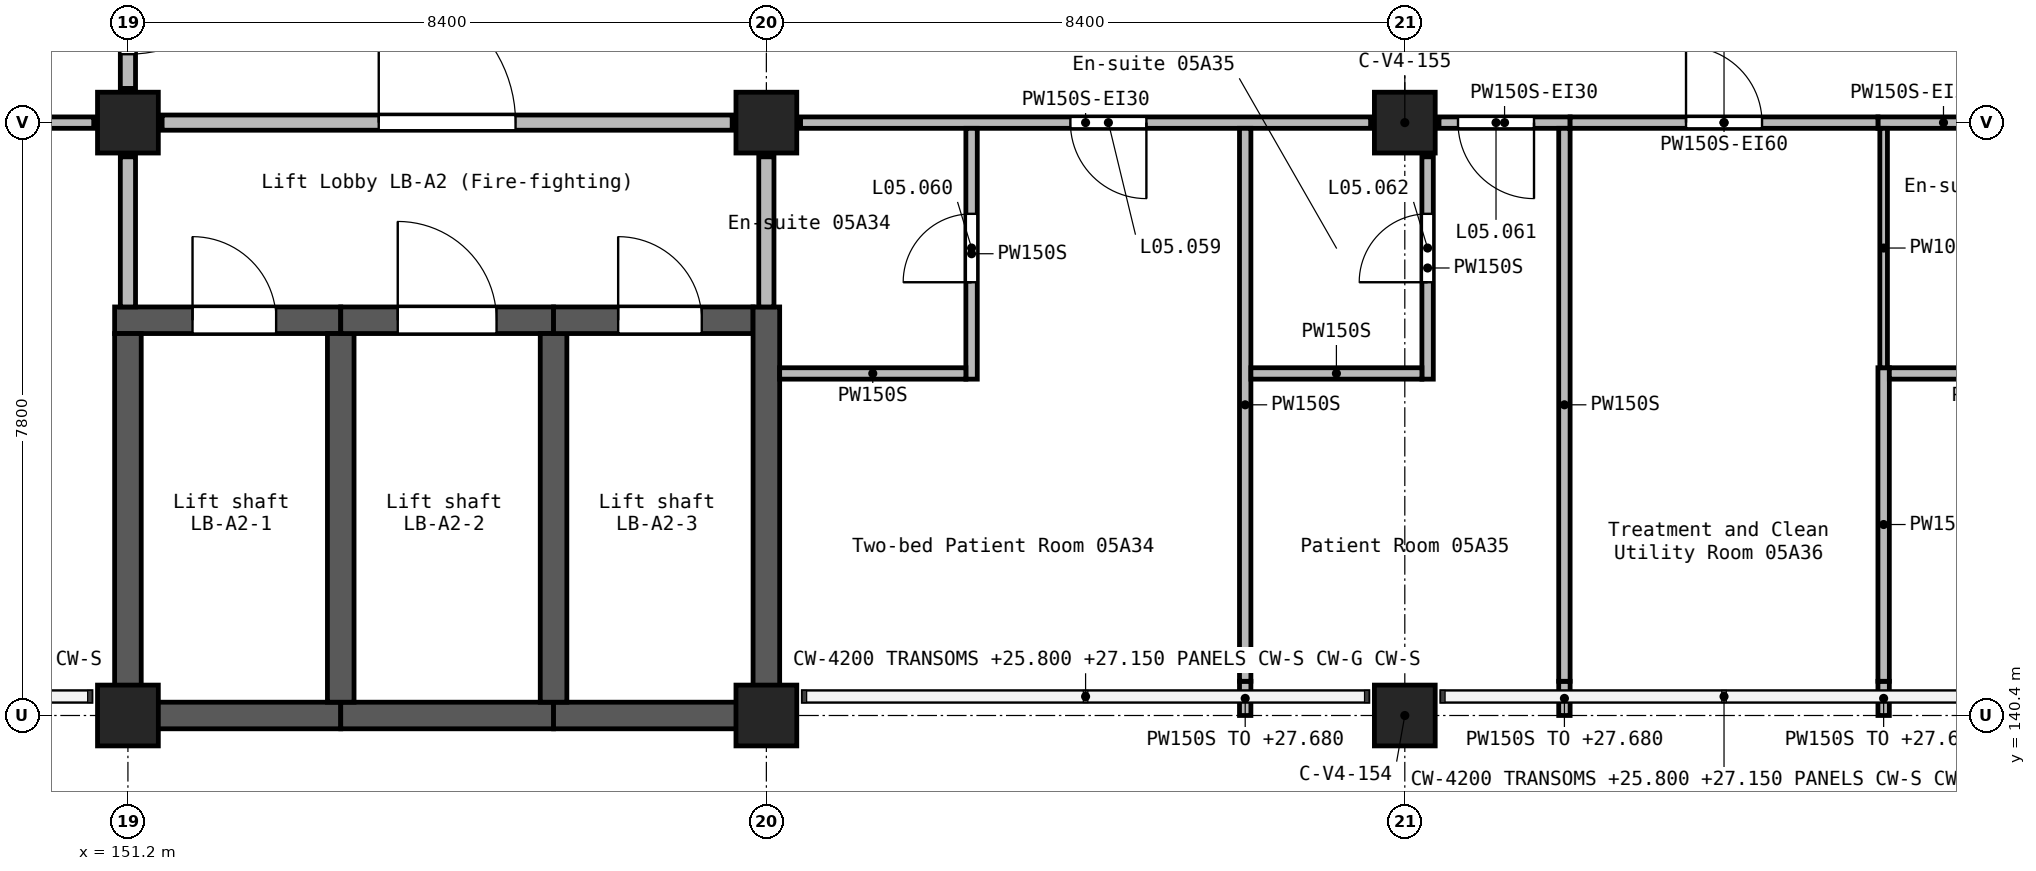
"""IFC4 building model, lengths in metres.
Left out: names, types, materials, properties, quantities, classifications, styles, units other than length and angle.
Written with IfcOpenShell. Run it as: python <this file> out.ifc"""

import sys

from ifc_helpers import new_model, si_unit, direction, frame, frame_2d, origin, origin_2d, place, context, subcontext, project, spatial, rectangle, extrude, element, fill, save


model = new_model("IFC4")
c1 = context("Model", 3, precision=1e-05, world=origin(), true_north=direction((0.0, 1.0)))
c2 = subcontext(c1, "Body", "Model", "MODEL_VIEW")
j1 = project(units=[si_unit("LENGTHUNIT", "METRE"), si_unit("PLANEANGLEUNIT", "RADIAN")], contexts=[c1])
p1 = place(None, origin())
s1 = spatial("IfcSite", under=j1, at=p1, CompositionType="ELEMENT")
p2 = place(p1, origin())
s2 = spatial("IfcBuilding", under=s1, at=p2, CompositionType="ELEMENT")
p3 = place(p2, frame((0.0, 0.0, 24.9)))
s3 = spatial("IfcBuildingStorey", under=s2, at=p3, CompositionType="ELEMENT", Elevation=24.9)
for number, where, z_axis, x_axis in (
    (1, (151.2, 140.4, 0.0), (0.0, 0.0, 1.0), (1.0, 0.0, 0.0)),
    (2, (151.2, 148.2, 0.0), (0.0, 0.0, 1.0), (1.0, 0.0, 0.0)),
    (3, (159.6, 140.4, 0.0), (0.0, 0.0, 1.0), (1.0, 0.0, 0.0)),
    (4, (159.6, 148.2, 0.0), (0.0, 0.0, 1.0), (1.0, 0.0, 0.0)),
    (5, (168.0, 140.4, 0.0), (0.0, 0.0, 1.0), (1.0, 0.0, 0.0)),
    (6, (168.0, 148.2, 0.0), (0.0, 0.0, 1.0), (1.0, 0.0, 0.0)),
):
    element("IfcColumn", number, at=place(p3, frame(where, z_axis=z_axis, x_axis=x_axis)), inside=s3, PredefinedType="COLUMN", context=c2, shape_type="SweptSolid", body=[
        extrude(rectangle(XDim=0.8, YDim=0.8, at=origin_2d()), origin(), (0.0, 0.0, 1.0), 3.9),
    ])
p4 = place(p3, frame((151.025, 145.6, 0.0), z_axis=(0.0, 0.0, 1.0), x_axis=(1.0, 0.0, 0.0)))
e7 = element("IfcWall", 7, at=p4, inside=s3, PredefinedType="SHEAR", context=c2, shape_type="SweptSolid", body=[
    extrude(rectangle(XDim=2.975, YDim=0.35, at=frame_2d((1.488, 0.0))), origin(), (0.0, 0.0, 1.0), 3.9),
])
p5 = place(p4, frame((1.025, 0.0, 0.0)))
e8 = element("IfcOpeningElement", 8, at=p5, cuts=e7, PredefinedType="OPENING", context=c2, shape_type="SweptSolid", body=[
    extrude(rectangle(XDim=1.1, YDim=2.1, at=frame_2d((0.55, 1.05))), frame((0.0, 0.185, 0.0), z_axis=(0.0, -1.0, 0.0), x_axis=(1.0, 0.0, 0.0)), (0.0, 0.0, 1.0), 0.37),
])
p6 = place(p3, frame((151.2, 140.225, 0.0), z_axis=(0.0, 0.0, 1.0), x_axis=(0.0, 1.0, 0.0)))
e9 = element("IfcWall", 9, at=p6, inside=s3, PredefinedType="SHEAR", context=c2, shape_type="SweptSolid", body=[
    extrude(rectangle(XDim=5.2, YDim=0.35, at=frame_2d((2.6, 0.0))), origin(), (0.0, 0.0, 1.0), 3.9),
])
p7 = place(p3, frame((151.375, 140.4, 0.0), z_axis=(0.0, 0.0, 1.0), x_axis=(1.0, 0.0, 0.0)))
e10 = element("IfcWall", 10, at=p7, inside=s3, PredefinedType="SHEAR", context=c2, shape_type="SweptSolid", body=[
    extrude(rectangle(XDim=2.625, YDim=0.35, at=frame_2d((1.312, 0.0))), origin(), (0.0, 0.0, 1.0), 3.9),
])
p8 = place(p3, frame((154.0, 140.4, 0.0), z_axis=(0.0, 0.0, 1.0), x_axis=(1.0, 0.0, 0.0)))
e11 = element("IfcWall", 11, at=p8, inside=s3, PredefinedType="SHEAR", context=c2, shape_type="SweptSolid", body=[
    extrude(rectangle(XDim=2.8, YDim=0.35, at=frame_2d((1.4, 0.0))), origin(), (0.0, 0.0, 1.0), 3.9),
])
p9 = place(p3, frame((154.0, 140.575, 0.0), z_axis=(0.0, 0.0, 1.0), x_axis=(0.0, 1.0, 0.0)))
e12 = element("IfcWall", 12, at=p9, inside=s3, PredefinedType="SHEAR", context=c2, shape_type="SweptSolid", body=[
    extrude(rectangle(XDim=4.85, YDim=0.35, at=frame_2d((2.425, 0.0))), origin(), (0.0, 0.0, 1.0), 3.9),
])
p10 = place(p3, frame((154.0, 145.6, 0.0), z_axis=(0.0, 0.0, 1.0), x_axis=(1.0, 0.0, 0.0)))
e13 = element("IfcWall", 13, at=p10, inside=s3, PredefinedType="SHEAR", context=c2, shape_type="SweptSolid", body=[
    extrude(rectangle(XDim=2.8, YDim=0.35, at=frame_2d((1.4, 0.0))), origin(), (0.0, 0.0, 1.0), 3.9),
])
p11 = place(p10, frame((0.75, 0.0, 0.0)))
e14 = element("IfcOpeningElement", 14, at=p11, cuts=e13, PredefinedType="OPENING", context=c2, shape_type="SweptSolid", body=[
    extrude(rectangle(XDim=1.3, YDim=2.1, at=frame_2d((0.65, 1.05))), frame((0.0, 0.185, 0.0), z_axis=(0.0, -1.0, 0.0), x_axis=(1.0, 0.0, 0.0)), (0.0, 0.0, 1.0), 0.37),
])
p12 = place(p3, frame((156.8, 140.4, 0.0), z_axis=(0.0, 0.0, 1.0), x_axis=(1.0, 0.0, 0.0)))
e15 = element("IfcWall", 15, at=p12, inside=s3, PredefinedType="SHEAR", context=c2, shape_type="SweptSolid", body=[
    extrude(rectangle(XDim=2.625, YDim=0.35, at=frame_2d((1.312, 0.0))), origin(), (0.0, 0.0, 1.0), 3.9),
])
p13 = place(p3, frame((156.8, 140.575, 0.0), z_axis=(0.0, 0.0, 1.0), x_axis=(0.0, 1.0, 0.0)))
e16 = element("IfcWall", 16, at=p13, inside=s3, PredefinedType="SHEAR", context=c2, shape_type="SweptSolid", body=[
    extrude(rectangle(XDim=4.85, YDim=0.35, at=frame_2d((2.425, 0.0))), origin(), (0.0, 0.0, 1.0), 3.9),
])
p14 = place(p3, frame((156.8, 145.6, 0.0), z_axis=(0.0, 0.0, 1.0), x_axis=(1.0, 0.0, 0.0)))
e17 = element("IfcWall", 17, at=p14, inside=s3, PredefinedType="SHEAR", context=c2, shape_type="SweptSolid", body=[
    extrude(rectangle(XDim=2.625, YDim=0.35, at=frame_2d((1.312, 0.0))), origin(), (0.0, 0.0, 1.0), 3.9),
])
p15 = place(p14, frame((0.85, 0.0, 0.0)))
e18 = element("IfcOpeningElement", 18, at=p15, cuts=e17, PredefinedType="OPENING", context=c2, shape_type="SweptSolid", body=[
    extrude(rectangle(XDim=1.1, YDim=2.1, at=frame_2d((0.55, 1.05))), frame((0.0, 0.185, 0.0), z_axis=(0.0, -1.0, 0.0), x_axis=(1.0, 0.0, 0.0)), (0.0, 0.0, 1.0), 0.37),
])
p16 = place(p3, frame((159.6, 140.225, 0.0), z_axis=(0.0, 0.0, 1.0), x_axis=(0.0, 1.0, 0.0)))
e19 = element("IfcWall", 19, at=p16, inside=s3, PredefinedType="SHEAR", context=c2, shape_type="SweptSolid", body=[
    extrude(rectangle(XDim=5.55, YDim=0.35, at=frame_2d((2.775, 0.0))), origin(), (0.0, 0.0, 1.0), 3.9),
])
p17 = place(p3, frame((151.2, 151.35, 0.0), z_axis=(0.0, 0.0, 1.0), x_axis=(0.0, -1.0, 0.0)))
e20 = element("IfcWall", 20, at=p17, inside=s3, PredefinedType="SOLIDWALL", context=c2, shape_type="SweptSolid", body=[
    extrude(rectangle(XDim=2.7, YDim=0.2, at=frame_2d((1.35, 0.0))), origin(), (0.0, 0.0, 1.0), 3.6),
])
p18 = place(p17, frame((0.45, 0.0, 0.0)))
e21 = element("IfcOpeningElement", 21, at=p18, cuts=e20, PredefinedType="OPENING", context=c2, shape_type="SweptSolid", body=[
    extrude(rectangle(XDim=1.8, YDim=2.1, at=frame_2d((0.9, 1.05))), frame((0.0, 0.11, 0.0), z_axis=(0.0, -1.0, 0.0), x_axis=(1.0, 0.0, 0.0)), (0.0, 0.0, 1.0), 0.22),
])
p19 = place(p3, frame((151.2, 147.75, 0.0), z_axis=(0.0, 0.0, 1.0), x_axis=(0.0, -1.0, 0.0)))
e22 = element("IfcWall", 22, at=p19, inside=s3, PredefinedType="SOLIDWALL", context=c2, shape_type="SweptSolid", body=[
    extrude(rectangle(XDim=1.975, YDim=0.2, at=frame_2d((0.988, 0.0))), origin(), (0.0, 0.0, 1.0), 3.6),
])
p20 = place(p3, frame((151.65, 148.2, 0.0), z_axis=(0.0, 0.0, 1.0), x_axis=(1.0, 0.0, 0.0)))
e23 = element("IfcWall", 23, at=p20, inside=s3, PredefinedType="SOLIDWALL", context=c2, shape_type="SweptSolid", body=[
    extrude(rectangle(XDim=7.5, YDim=0.2, at=frame_2d((3.75, 0.0))), origin(), (0.0, 0.0, 1.0), 3.6),
])
p21 = place(p20, frame((2.85, 0.0, 0.0)))
e24 = element("IfcOpeningElement", 24, at=p21, cuts=e23, PredefinedType="OPENING", context=c2, shape_type="SweptSolid", body=[
    extrude(rectangle(XDim=1.8, YDim=2.1, at=frame_2d((0.9, 1.05))), frame((0.0, 0.11, 0.0), z_axis=(0.0, -1.0, 0.0), x_axis=(1.0, 0.0, 0.0)), (0.0, 0.0, 1.0), 0.22),
])
p22 = place(p3, frame((159.6, 145.775, 0.0), z_axis=(0.0, 0.0, 1.0), x_axis=(0.0, 1.0, 0.0)))
e25 = element("IfcWall", 25, at=p22, inside=s3, PredefinedType="SOLIDWALL", context=c2, shape_type="SweptSolid", body=[
    extrude(rectangle(XDim=1.975, YDim=0.2, at=frame_2d((0.988, 0.0))), origin(), (0.0, 0.0, 1.0), 3.6),
])
p23 = place(p3, frame((170.175, 148.2, 0.0), z_axis=(0.0, 0.0, 1.0), x_axis=(-1.0, 0.0, 0.0)))
e26 = element("IfcWall", 26, at=p23, inside=s3, PredefinedType="PARTITIONING", context=c2, shape_type="SweptSolid", body=[
    extrude(rectangle(XDim=1.725, YDim=0.15, at=frame_2d((0.863, 0.0))), origin(), (0.0, 0.0, 1.0), 3.6),
])
p24 = place(p23, frame((0.475, 0.0, 0.0)))
e27 = element("IfcOpeningElement", 27, at=p24, cuts=e26, PredefinedType="OPENING", context=c2, shape_type="SweptSolid", body=[
    extrude(rectangle(XDim=1.0, YDim=2.1, at=frame_2d((0.5, 1.05))), frame((0.0, 0.085, 0.0), z_axis=(0.0, -1.0, 0.0), x_axis=(1.0, 0.0, 0.0)), (0.0, 0.0, 1.0), 0.17),
])
p25 = place(p3, frame((167.55, 148.2, 0.0), z_axis=(0.0, 0.0, 1.0), x_axis=(-1.0, 0.0, 0.0)))
e28 = element("IfcWall", 28, at=p25, inside=s3, PredefinedType="PARTITIONING", context=c2, shape_type="SweptSolid", body=[
    extrude(rectangle(XDim=7.5, YDim=0.15, at=frame_2d((3.75, 0.0))), origin(), (0.0, 0.0, 1.0), 3.6),
])
p26 = place(p25, frame((2.95, 0.0, 0.0)))
e29 = element("IfcOpeningElement", 29, at=p26, cuts=e28, PredefinedType="OPENING", context=c2, shape_type="SweptSolid", body=[
    extrude(rectangle(XDim=1.0, YDim=2.1, at=frame_2d((0.5, 1.05))), frame((0.0, 0.085, 0.0), z_axis=(0.0, -1.0, 0.0), x_axis=(1.0, 0.0, 0.0)), (0.0, 0.0, 1.0), 0.17),
])
p27 = place(p3, frame((143.25, 148.2, 0.0), z_axis=(0.0, 0.0, 1.0), x_axis=(1.0, 0.0, 0.0)))
e30 = element("IfcWall", 30, at=p27, inside=s3, PredefinedType="PARTITIONING", context=c2, shape_type="SweptSolid", body=[
    extrude(rectangle(XDim=7.5, YDim=0.15, at=frame_2d((3.75, 0.0))), origin(), (0.0, 0.0, 1.0), 3.6),
])
p28 = place(p27, frame((4.6, 0.0, 0.0)))
e31 = element("IfcOpeningElement", 31, at=p28, cuts=e30, PredefinedType="OPENING", context=c2, shape_type="SweptSolid", body=[
    extrude(rectangle(XDim=1.0, YDim=2.1, at=frame_2d((0.5, 1.05))), frame((0.0, 0.085, 0.0), z_axis=(0.0, -1.0, 0.0), x_axis=(1.0, 0.0, 0.0)), (0.0, 0.0, 1.0), 0.17),
])
p29 = place(p3, frame((174.225, 148.2, 0.0), z_axis=(0.0, 0.0, 1.0), x_axis=(1.0, 0.0, 0.0)))
e32 = element("IfcWall", 32, at=p29, inside=s3, PredefinedType="PARTITIONING", context=c2, shape_type="SweptSolid", body=[
    extrude(rectangle(XDim=1.725, YDim=0.15, at=frame_2d((0.862, 0.0))), origin(), (0.0, 0.0, 1.0), 3.6),
])
p30 = place(p3, frame((170.175, 148.2, 0.0), z_axis=(0.0, 0.0, 1.0), x_axis=(1.0, 0.0, 0.0)))
e33 = element("IfcWall", 33, at=p30, inside=s3, PredefinedType="PARTITIONING", context=c2, shape_type="SweptSolid", body=[
    extrude(rectangle(XDim=4.05, YDim=0.15, at=frame_2d((2.025, 0.0))), origin(), (0.0, 0.0, 1.0), 3.6),
])
p31 = place(p30, frame((1.525, 0.0, 0.0)))
e34 = element("IfcOpeningElement", 34, at=p31, cuts=e33, PredefinedType="OPENING", context=c2, shape_type="SweptSolid", body=[
    extrude(rectangle(XDim=1.0, YDim=2.1, at=frame_2d((0.5, 1.05))), frame((0.0, 0.085, 0.0), z_axis=(0.0, -1.0, 0.0), x_axis=(1.0, 0.0, 0.0)), (0.0, 0.0, 1.0), 0.17),
])
p32 = place(p3, frame((165.9, 140.4, 0.0), z_axis=(0.0, 0.0, 1.0), x_axis=(0.0, 1.0, 0.0)))
e35 = element("IfcWall", 35, at=p32, inside=s3, PredefinedType="PARTITIONING", context=c2, shape_type="SweptSolid", body=[
    extrude(rectangle(XDim=0.45, YDim=0.15, at=frame_2d((0.225, 0.0))), origin(), (0.0, 0.0, 1.0), 2.78),
])
p33 = place(p3, frame((165.9, 140.85, 0.0), z_axis=(0.0, 0.0, 1.0), x_axis=(0.0, 1.0, 0.0)))
e36 = element("IfcWall", 36, at=p33, inside=s3, PredefinedType="PARTITIONING", context=c2, shape_type="SweptSolid", body=[
    extrude(rectangle(XDim=7.275, YDim=0.15, at=frame_2d((3.637, 0.0))), origin(), (0.0, 0.0, 1.0), 3.6),
])
p34 = place(p3, frame((170.1, 140.4, 0.0), z_axis=(0.0, 0.0, 1.0), x_axis=(0.0, 1.0, 0.0)))
e37 = element("IfcWall", 37, at=p34, inside=s3, PredefinedType="PARTITIONING", context=c2, shape_type="SweptSolid", body=[
    extrude(rectangle(XDim=0.45, YDim=0.15, at=frame_2d((0.225, 0.0))), origin(), (0.0, 0.0, 1.0), 2.78),
])
p35 = place(p3, frame((170.1, 140.85, 0.0), z_axis=(0.0, 0.0, 1.0), x_axis=(0.0, 1.0, 0.0)))
e38 = element("IfcWall", 38, at=p35, inside=s3, PredefinedType="PARTITIONING", context=c2, shape_type="SweptSolid", body=[
    extrude(rectangle(XDim=7.275, YDim=0.15, at=frame_2d((3.637, 0.0))), origin(), (0.0, 0.0, 1.0), 3.6),
])
p36 = place(p3, frame((174.3, 140.4, 0.0), z_axis=(0.0, 0.0, 1.0), x_axis=(0.0, 1.0, 0.0)))
e39 = element("IfcWall", 39, at=p36, inside=s3, PredefinedType="PARTITIONING", context=c2, shape_type="SweptSolid", body=[
    extrude(rectangle(XDim=0.45, YDim=0.15, at=frame_2d((0.225, 0.0))), origin(), (0.0, 0.0, 1.0), 2.78),
])
p37 = place(p3, frame((174.3, 140.85, 0.0), z_axis=(0.0, 0.0, 1.0), x_axis=(0.0, 1.0, 0.0)))
e40 = element("IfcWall", 40, at=p37, inside=s3, PredefinedType="PARTITIONING", context=c2, shape_type="SweptSolid", body=[
    extrude(rectangle(XDim=4.125, YDim=0.15, at=frame_2d((2.062, 0.0))), origin(), (0.0, 0.0, 1.0), 3.6),
])
p38 = place(p3, frame((162.3, 144.825, 0.0), z_axis=(0.0, 0.0, 1.0), x_axis=(0.0, 1.0, 0.0)))
e41 = element("IfcWall", 41, at=p38, inside=s3, PredefinedType="PARTITIONING", context=c2, shape_type="SweptSolid", body=[
    extrude(rectangle(XDim=3.3, YDim=0.15, at=frame_2d((1.65, 0.0))), origin(), (0.0, 0.0, 1.0), 3.6),
])
p39 = place(p38, frame((1.275, 0.0, 0.0)))
e42 = element("IfcOpeningElement", 42, at=p39, cuts=e41, PredefinedType="OPENING", context=c2, shape_type="SweptSolid", body=[
    extrude(rectangle(XDim=0.9, YDim=2.1, at=frame_2d((0.45, 1.05))), frame((0.0, 0.085, 0.0), z_axis=(0.0, -1.0, 0.0), x_axis=(1.0, 0.0, 0.0)), (0.0, 0.0, 1.0), 0.17),
])
p40 = place(p3, frame((168.3, 144.825, 0.0), z_axis=(0.0, 0.0, 1.0), x_axis=(0.0, 1.0, 0.0)))
e43 = element("IfcWall", 43, at=p40, inside=s3, PredefinedType="PARTITIONING", context=c2, shape_type="SweptSolid", body=[
    extrude(rectangle(XDim=2.925, YDim=0.15, at=frame_2d((1.462, 0.0))), origin(), (0.0, 0.0, 1.0), 3.6),
])
p41 = place(p40, frame((1.275, 0.0, 0.0)))
e44 = element("IfcOpeningElement", 44, at=p41, cuts=e43, PredefinedType="OPENING", context=c2, shape_type="SweptSolid", body=[
    extrude(rectangle(XDim=0.9, YDim=2.1, at=frame_2d((0.45, 1.05))), frame((0.0, 0.085, 0.0), z_axis=(0.0, -1.0, 0.0), x_axis=(1.0, 0.0, 0.0)), (0.0, 0.0, 1.0), 0.17),
])
p42 = place(p3, frame((159.775, 144.9, 0.0), z_axis=(0.0, 0.0, 1.0), x_axis=(1.0, 0.0, 0.0)))
e45 = element("IfcWall", 45, at=p42, inside=s3, PredefinedType="PARTITIONING", context=c2, shape_type="SweptSolid", body=[
    extrude(rectangle(XDim=2.45, YDim=0.15, at=frame_2d((1.225, 0.0))), origin(), (0.0, 0.0, 1.0), 3.6),
])
p43 = place(p3, frame((174.375, 144.9, 0.0), z_axis=(0.0, 0.0, 1.0), x_axis=(1.0, 0.0, 0.0)))
e46 = element("IfcWall", 46, at=p43, inside=s3, PredefinedType="PARTITIONING", context=c2, shape_type="SweptSolid", body=[
    extrude(rectangle(XDim=2.55, YDim=0.15, at=frame_2d((1.275, 0.0))), origin(), (0.0, 0.0, 1.0), 3.6),
])
p44 = place(p3, frame((165.975, 144.9, 0.0), z_axis=(0.0, 0.0, 1.0), x_axis=(1.0, 0.0, 0.0)))
e47 = element("IfcWall", 47, at=p44, inside=s3, PredefinedType="PARTITIONING", context=c2, shape_type="SweptSolid", body=[
    extrude(rectangle(XDim=2.25, YDim=0.15, at=frame_2d((1.125, 0.0))), origin(), (0.0, 0.0, 1.0), 3.6),
])
p45 = place(p3, frame((174.3, 144.975, 0.0), z_axis=(0.0, 0.0, 1.0), x_axis=(0.0, 1.0, 0.0)))
e48 = element("IfcWall", 48, at=p45, inside=s3, PredefinedType="PARTITIONING", context=c2, shape_type="SweptSolid", body=[
    extrude(rectangle(XDim=3.15, YDim=0.1, at=frame_2d((1.575, 0.0))), origin(), (0.0, 0.0, 1.0), 3.6),
])
p46 = place(p18, origin())
e49 = element("IfcDoor", 49, at=p46, inside=s3, OperationType="DOUBLE_DOOR_SINGLE_SWING", PredefinedType="DOOR", context=c2, shape_type="SweptSolid", body=[
    extrude(rectangle(XDim=1.8, YDim=2.1, at=frame_2d((0.9, 1.05))), frame((0.0, 0.025, 0.0), z_axis=(0.0, -1.0, 0.0), x_axis=(1.0, 0.0, 0.0)), (0.0, 0.0, 1.0), 0.05),
])
fill(e21, e49)
p47 = place(p26, origin())
e50 = element("IfcDoor", 50, at=p47, inside=s3, OperationType="SINGLE_SWING_LEFT", PredefinedType="DOOR", context=c2, shape_type="SweptSolid", body=[
    extrude(rectangle(XDim=1.0, YDim=2.1, at=frame_2d((0.5, 1.05))), frame((0.0, 0.025, 0.0), z_axis=(0.0, -1.0, 0.0), x_axis=(1.0, 0.0, 0.0)), (0.0, 0.0, 1.0), 0.05),
])
fill(e29, e50)
p48 = place(p39, origin())
e51 = element("IfcDoor", 51, at=p48, inside=s3, OperationType="SINGLE_SWING_RIGHT", PredefinedType="DOOR", context=c2, shape_type="SweptSolid", body=[
    extrude(rectangle(XDim=0.9, YDim=2.1, at=frame_2d((0.45, 1.05))), frame((0.0, 0.025, 0.0), z_axis=(0.0, -1.0, 0.0), x_axis=(1.0, 0.0, 0.0)), (0.0, 0.0, 1.0), 0.05),
])
fill(e42, e51)
p49 = place(p24, origin())
e52 = element("IfcDoor", 52, at=p49, inside=s3, OperationType="SINGLE_SWING_RIGHT", PredefinedType="DOOR", context=c2, shape_type="SweptSolid", body=[
    extrude(rectangle(XDim=1.0, YDim=2.1, at=frame_2d((0.5, 1.05))), frame((0.0, 0.025, 0.0), z_axis=(0.0, -1.0, 0.0), x_axis=(1.0, 0.0, 0.0)), (0.0, 0.0, 1.0), 0.05),
])
fill(e27, e52)
p50 = place(p41, origin())
e53 = element("IfcDoor", 53, at=p50, inside=s3, OperationType="SINGLE_SWING_RIGHT", PredefinedType="DOOR", context=c2, shape_type="SweptSolid", body=[
    extrude(rectangle(XDim=0.9, YDim=2.1, at=frame_2d((0.45, 1.05))), frame((0.0, 0.025, 0.0), z_axis=(0.0, -1.0, 0.0), x_axis=(1.0, 0.0, 0.0)), (0.0, 0.0, 1.0), 0.05),
])
fill(e44, e53)
p51 = place(p31, frame((1.0, 0.0, 0.0), z_axis=(0.0, 0.0, 1.0), x_axis=(-1.0, 0.0, 0.0)))
e54 = element("IfcDoor", 54, at=p51, inside=s3, OperationType="SINGLE_SWING_RIGHT", PredefinedType="DOOR", context=c2, shape_type="SweptSolid", body=[
    extrude(rectangle(XDim=1.0, YDim=2.1, at=frame_2d((0.5, 1.05))), frame((0.0, 0.025, 0.0), z_axis=(0.0, -1.0, 0.0), x_axis=(1.0, 0.0, 0.0)), (0.0, 0.0, 1.0), 0.05),
])
fill(e34, e54)
p52 = place(p21, frame((1.8, 0.0, 0.0), z_axis=(0.0, 0.0, 1.0), x_axis=(-1.0, 0.0, 0.0)))
e55 = element("IfcDoor", 55, at=p52, inside=s3, OperationType="DOUBLE_DOOR_SINGLE_SWING", PredefinedType="DOOR", context=c2, shape_type="SweptSolid", body=[
    extrude(rectangle(XDim=1.8, YDim=2.1, at=frame_2d((0.9, 1.05))), frame((0.0, 0.025, 0.0), z_axis=(0.0, -1.0, 0.0), x_axis=(1.0, 0.0, 0.0)), (0.0, 0.0, 1.0), 0.05),
])
fill(e24, e55)
p53 = place(p5, origin())
e56 = element("IfcDoor", 56, at=p53, inside=s3, OperationType="DOUBLE_DOOR_SLIDING", PredefinedType="DOOR", context=c2, shape_type="SweptSolid", body=[
    extrude(rectangle(XDim=1.1, YDim=2.1, at=frame_2d((0.55, 1.05))), frame((0.0, 0.025, 0.0), z_axis=(0.0, -1.0, 0.0), x_axis=(1.0, 0.0, 0.0)), (0.0, 0.0, 1.0), 0.05),
])
fill(e8, e56)
p54 = place(p11, origin())
e57 = element("IfcDoor", 57, at=p54, inside=s3, OperationType="DOUBLE_DOOR_SLIDING", PredefinedType="DOOR", context=c2, shape_type="SweptSolid", body=[
    extrude(rectangle(XDim=1.3, YDim=2.1, at=frame_2d((0.65, 1.05))), frame((0.0, 0.025, 0.0), z_axis=(0.0, -1.0, 0.0), x_axis=(1.0, 0.0, 0.0)), (0.0, 0.0, 1.0), 0.05),
])
fill(e14, e57)
p55 = place(p15, origin())
e58 = element("IfcDoor", 58, at=p55, inside=s3, OperationType="DOUBLE_DOOR_SLIDING", PredefinedType="DOOR", context=c2, shape_type="SweptSolid", body=[
    extrude(rectangle(XDim=1.1, YDim=2.1, at=frame_2d((0.55, 1.05))), frame((0.0, 0.025, 0.0), z_axis=(0.0, -1.0, 0.0), x_axis=(1.0, 0.0, 0.0)), (0.0, 0.0, 1.0), 0.05),
])
fill(e18, e58)
save(model, sys.argv[1])
